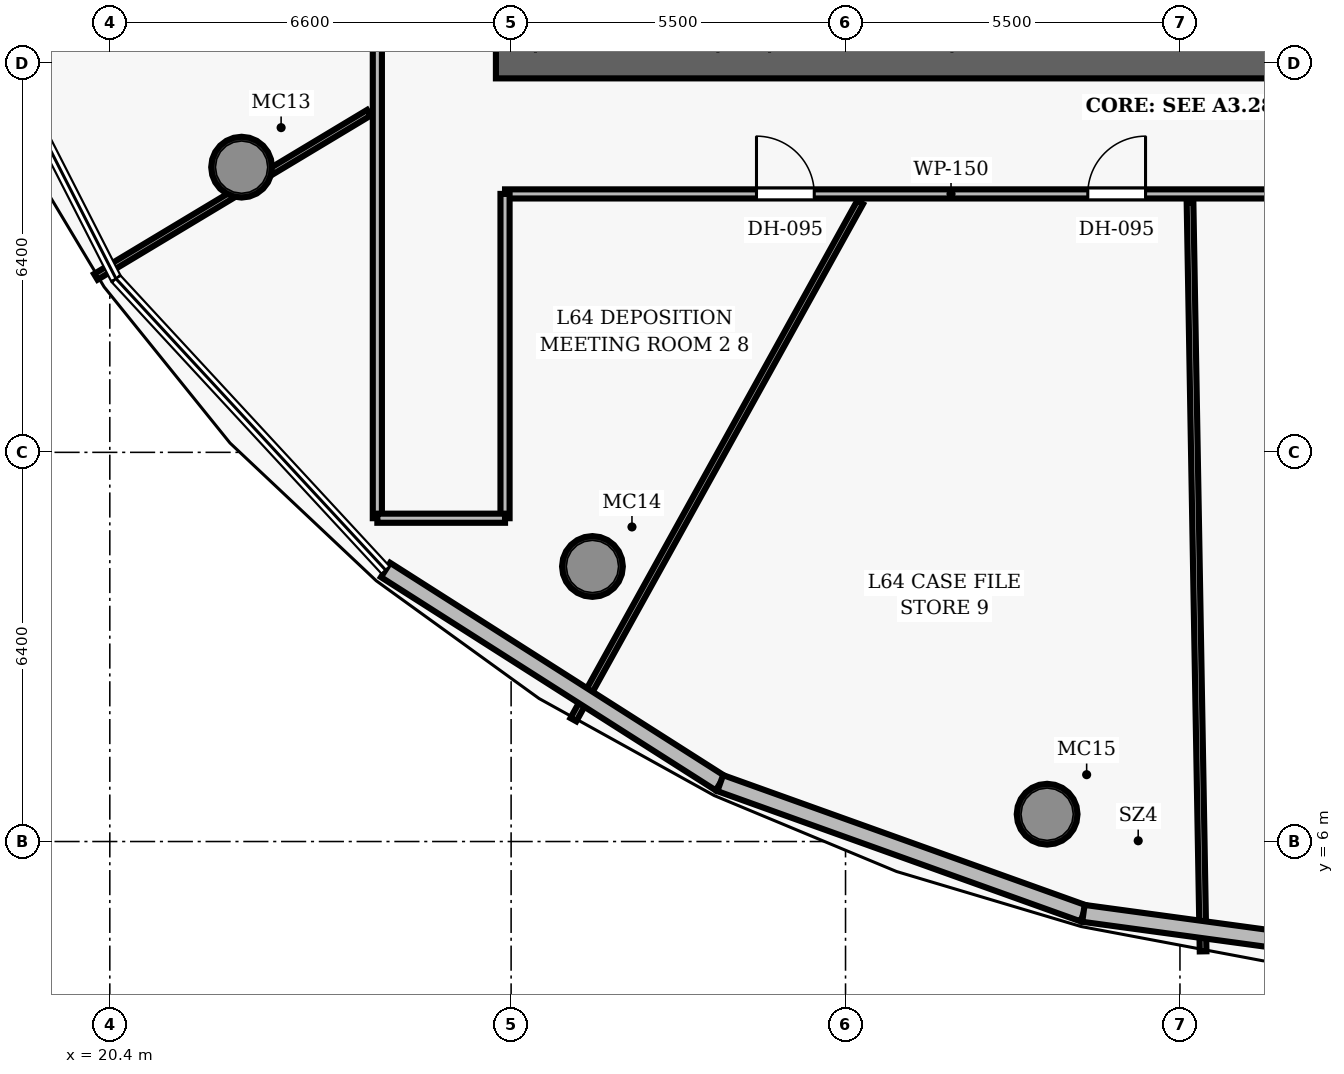
"""IFC4 building model, lengths in metres.
Left out: names, types, materials, properties, quantities, classifications, styles, units other than length and angle.
Written with IfcOpenShell. Run it as: python <this file> out.ifc"""

import sys

from ifc_helpers import new_model, si_unit, direction, frame, frame_2d, origin, origin_2d, place, context, subcontext, project, spatial, rectangle, hollow_circle, extrude, element, fill, save


model = new_model("IFC4")
c1 = context("Model", 3, precision=1e-05, world=origin(), true_north=direction((0.0, 1.0)))
c2 = subcontext(c1, "Body", "Model", "MODEL_VIEW")
j1 = project(units=[si_unit("LENGTHUNIT", "METRE"), si_unit("PLANEANGLEUNIT", "RADIAN")], contexts=[c1])
p1 = place(None, origin())
s1 = spatial("IfcSite", under=j1, at=p1, CompositionType="ELEMENT")
p2 = place(p1, origin())
s2 = spatial("IfcBuilding", under=s1, at=p2, CompositionType="ELEMENT")
p3 = place(p2, frame((0.0, 0.0, 253.6)))
s3 = spatial("IfcBuildingStorey", under=s2, at=p3, CompositionType="ELEMENT", Elevation=253.6)
p4 = place(p3, frame((26.75, 18.8, 0.0), z_axis=(0.0, 0.0, 1.0), x_axis=(1.0, 0.0, 0.0)))
e1 = element("IfcWall", 1, at=p4, inside=s3, PredefinedType="SHEAR", context=c2, shape_type="SweptSolid", body=[
    extrude(rectangle(XDim=22.5, YDim=0.5, at=frame_2d((11.25, 0.0))), origin(), (0.0, 0.0, 1.0), 3.85),
])
p5 = place(p4, frame((14.47, 0.0, 0.0)))
e2 = element("IfcOpeningElement", 2, at=p5, cuts=e1, PredefinedType="OPENING", context=c2, shape_type="SweptSolid", body=[
    extrude(rectangle(XDim=1.05, YDim=2.15, at=frame_2d((0.525, 1.075))), frame((0.0, 0.26, 0.0), z_axis=(0.0, -1.0, 0.0), x_axis=(1.0, 0.0, 0.0)), (0.0, 0.0, 1.0), 0.52),
])
for number, where, z_axis, x_axis in (
    (3, (22.567, 17.09, 0.0), (0.0, 0.0, 1.0), (1.0, 0.0, 0.0)),
    (4, (28.338, 10.523, 0.0), (0.0, 0.0, 1.0), (1.0, 0.0, 0.0)),
    (5, (35.815, 6.449, 0.0), (0.0, 0.0, 1.0), (1.0, 0.0, 0.0)),
):
    element("IfcColumn", number, at=place(p3, frame(where, z_axis=z_axis, x_axis=x_axis)), inside=s3, PredefinedType="COLUMN", context=c2, shape_type="SweptSolid", body=[
        extrude(hollow_circle(Radius=0.5, WallThickness=0.045, at=origin_2d()), origin(), (0.0, 0.0, 1.0), 3.85),
    ])
p6 = place(p3, frame((26.9, 16.65, 0.0), z_axis=(0.0, 0.0, 1.0), x_axis=(1.0, 0.0, 0.0)))
e6 = element("IfcWall", 6, at=p6, inside=s3, PredefinedType="PARTITIONING", context=c2, shape_type="SweptSolid", body=[
    extrude(rectangle(XDim=22.2, YDim=0.15, at=frame_2d((11.1, 0.0))), origin(), (0.0, 0.0, 1.0), 3.04),
])
p7 = place(p6, frame((4.135, 0.0, 0.0)))
e7 = element("IfcOpeningElement", 7, at=p7, cuts=e6, PredefinedType="OPENING", context=c2, shape_type="SweptSolid", body=[
    extrude(rectangle(XDim=0.95, YDim=2.15, at=frame_2d((0.475, 1.075))), frame((0.0, 0.085, 0.0), z_axis=(0.0, -1.0, 0.0), x_axis=(1.0, 0.0, 0.0)), (0.0, 0.0, 1.0), 0.17),
])
p8 = place(p6, frame((9.584, 0.0, 0.0)))
e8 = element("IfcOpeningElement", 8, at=p8, cuts=e6, PredefinedType="OPENING", context=c2, shape_type="SweptSolid", body=[
    extrude(rectangle(XDim=0.95, YDim=2.15, at=frame_2d((0.475, 1.075))), frame((0.0, 0.085, 0.0), z_axis=(0.0, -1.0, 0.0), x_axis=(1.0, 0.0, 0.0)), (0.0, 0.0, 1.0), 0.17),
])
p9 = place(p6, frame((14.473, 0.0, 0.0)))
e9 = element("IfcOpeningElement", 9, at=p9, cuts=e6, PredefinedType="OPENING", context=c2, shape_type="SweptSolid", body=[
    extrude(rectangle(XDim=0.95, YDim=2.15, at=frame_2d((0.475, 1.075))), frame((0.0, 0.085, 0.0), z_axis=(0.0, -1.0, 0.0), x_axis=(1.0, 0.0, 0.0)), (0.0, 0.0, 1.0), 0.17),
])
p10 = place(p6, frame((17.445, 0.0, 0.0)))
e10 = element("IfcOpeningElement", 10, at=p10, cuts=e6, PredefinedType="OPENING", context=c2, shape_type="SweptSolid", body=[
    extrude(rectangle(XDim=0.95, YDim=2.15, at=frame_2d((0.475, 1.075))), frame((0.0, 0.085, 0.0), z_axis=(0.0, -1.0, 0.0), x_axis=(1.0, 0.0, 0.0)), (0.0, 0.0, 1.0), 0.17),
])
p11 = place(p3, frame((24.8, 11.317, 0.0), z_axis=(0.0, 0.0, 1.0), x_axis=(0.0, 1.0, 0.0)))
e11 = element("IfcWall", 11, at=p11, inside=s3, PredefinedType="PARTITIONING", context=c2, shape_type="SweptSolid", body=[
    extrude(rectangle(XDim=30.083, YDim=0.15, at=frame_2d((15.042, 0.0))), origin(), (0.0, 0.0, 1.0), 3.04),
])
p12 = place(p11, frame((17.785, 0.0, 0.0)))
e12 = element("IfcOpeningElement", 12, at=p12, cuts=e11, PredefinedType="OPENING", context=c2, shape_type="SweptSolid", body=[
    extrude(rectangle(XDim=0.95, YDim=2.15, at=frame_2d((0.475, 1.075))), frame((0.0, 0.085, 0.0), z_axis=(0.0, -1.0, 0.0), x_axis=(1.0, 0.0, 0.0)), (0.0, 0.0, 1.0), 0.17),
])
p13 = place(p11, frame((11.343, 0.0, 0.0)))
e13 = element("IfcOpeningElement", 13, at=p13, cuts=e11, PredefinedType="OPENING", context=c2, shape_type="SweptSolid", body=[
    extrude(rectangle(XDim=0.95, YDim=2.15, at=frame_2d((0.475, 1.075))), frame((0.0, 0.085, 0.0), z_axis=(0.0, -1.0, 0.0), x_axis=(1.0, 0.0, 0.0)), (0.0, 0.0, 1.0), 0.17),
])
p14 = place(p3, frame((26.9, 11.317, 0.0), z_axis=(0.0, 0.0, 1.0), x_axis=(0.0, 1.0, 0.0)))
e14 = element("IfcWall", 14, at=p14, inside=s3, PredefinedType="PARTITIONING", context=c2, shape_type="SweptSolid", body=[
    extrude(rectangle(XDim=5.333, YDim=0.15, at=frame_2d((2.667, 0.0))), origin(), (0.0, 0.0, 1.0), 3.04),
])
p15 = place(p3, frame((24.8, 11.317, 0.0), z_axis=(0.0, 0.0, 1.0), x_axis=(1.0, 0.0, 0.0)))
e15 = element("IfcWall", 15, at=p15, inside=s3, PredefinedType="PARTITIONING", context=c2, shape_type="SweptSolid", body=[
    extrude(rectangle(XDim=2.1, YDim=0.15, at=frame_2d((1.05, 0.0))), origin(), (0.0, 0.0, 1.0), 3.04),
])
p16 = place(p3, frame((24.66, 17.985, 0.0), z_axis=(0.0, 0.0, 1.0), x_axis=(-0.857147311937, -0.51507134034, 0.0)))
e16 = element("IfcWall", 16, at=p16, inside=s3, PredefinedType="PARTITIONING", context=c2, shape_type="SweptSolid", body=[
    extrude(rectangle(XDim=5.239, YDim=0.11, at=frame_2d((2.619, 0.0))), origin(), (0.0, 0.0, 1.0), 3.04),
])
p17 = place(p3, frame((32.74, 16.51, 0.0), z_axis=(0.0, 0.0, 1.0), x_axis=(-0.484794445223, -0.87462811862, 0.0)))
e17 = element("IfcWall", 17, at=p17, inside=s3, PredefinedType="PARTITIONING", context=c2, shape_type="SweptSolid", body=[
    extrude(rectangle(XDim=9.726, YDim=0.11, at=frame_2d((4.863, 0.0))), origin(), (0.0, 0.0, 1.0), 3.04),
])
p18 = place(p3, frame((38.166, 16.51, 0.0), z_axis=(0.0, 0.0, 1.0), x_axis=(0.017460864441, -0.999847547486, 0.0)))
e18 = element("IfcWall", 18, at=p18, inside=s3, PredefinedType="PARTITIONING", context=c2, shape_type="SweptSolid", body=[
    extrude(rectangle(XDim=12.318, YDim=0.11, at=frame_2d((6.159, 0.0))), origin(), (0.0, 0.0, 1.0), 3.04),
])
p19 = place(p3, frame((30.439, 6.96, 0.0), z_axis=(0.0, 0.0, 1.0), x_axis=(-0.843465794801, 0.537182885991, 0.0)))
e19 = element("IfcWall", 19, at=p19, inside=s3, PredefinedType="SOLIDWALL", context=c2, shape_type="SweptSolid", body=[
    extrude(rectangle(XDim=6.526, YDim=0.28, at=frame_2d((3.263, 0.0))), origin(), (0.0, 0.0, 1.0), 3.625),
])
p20 = place(p3, frame((36.412, 4.819, 0.0), z_axis=(0.0, 0.0, 1.0), x_axis=(-0.941337328655, 0.337467085328, 0.0)))
e20 = element("IfcWall", 20, at=p20, inside=s3, PredefinedType="SOLIDWALL", context=c2, shape_type="SweptSolid", body=[
    extrude(rectangle(XDim=6.345, YDim=0.28, at=frame_2d((3.173, 0.0))), origin(), (0.0, 0.0, 1.0), 3.625),
])
p21 = place(p3, frame((42.219, 4.029, 0.0), z_axis=(0.0, 0.0, 1.0), x_axis=(-0.990881813427, 0.134733929727, 0.0)))
e21 = element("IfcWall", 21, at=p21, inside=s3, PredefinedType="SOLIDWALL", context=c2, shape_type="SweptSolid", body=[
    extrude(rectangle(XDim=5.86, YDim=0.28, at=frame_2d((2.93, 0.0))), origin(), (0.0, 0.0, 1.0), 3.625),
])
p22 = place(p7, origin())
e22 = element("IfcDoor", 22, at=p22, inside=s3, OperationType="SINGLE_SWING_LEFT", PredefinedType="DOOR", context=c2, shape_type="SweptSolid", body=[
    extrude(rectangle(XDim=0.95, YDim=2.15, at=frame_2d((0.475, 1.075))), frame((0.0, 0.025, 0.0), z_axis=(0.0, -1.0, 0.0), x_axis=(1.0, 0.0, 0.0)), (0.0, 0.0, 1.0), 0.05),
])
fill(e7, e22)
p23 = place(p8, origin())
e23 = element("IfcDoor", 23, at=p23, inside=s3, OperationType="SINGLE_SWING_RIGHT", PredefinedType="DOOR", context=c2, shape_type="SweptSolid", body=[
    extrude(rectangle(XDim=0.95, YDim=2.15, at=frame_2d((0.475, 1.075))), frame((0.0, 0.025, 0.0), z_axis=(0.0, -1.0, 0.0), x_axis=(1.0, 0.0, 0.0)), (0.0, 0.0, 1.0), 0.05),
])
fill(e8, e23)
save(model, sys.argv[1])
